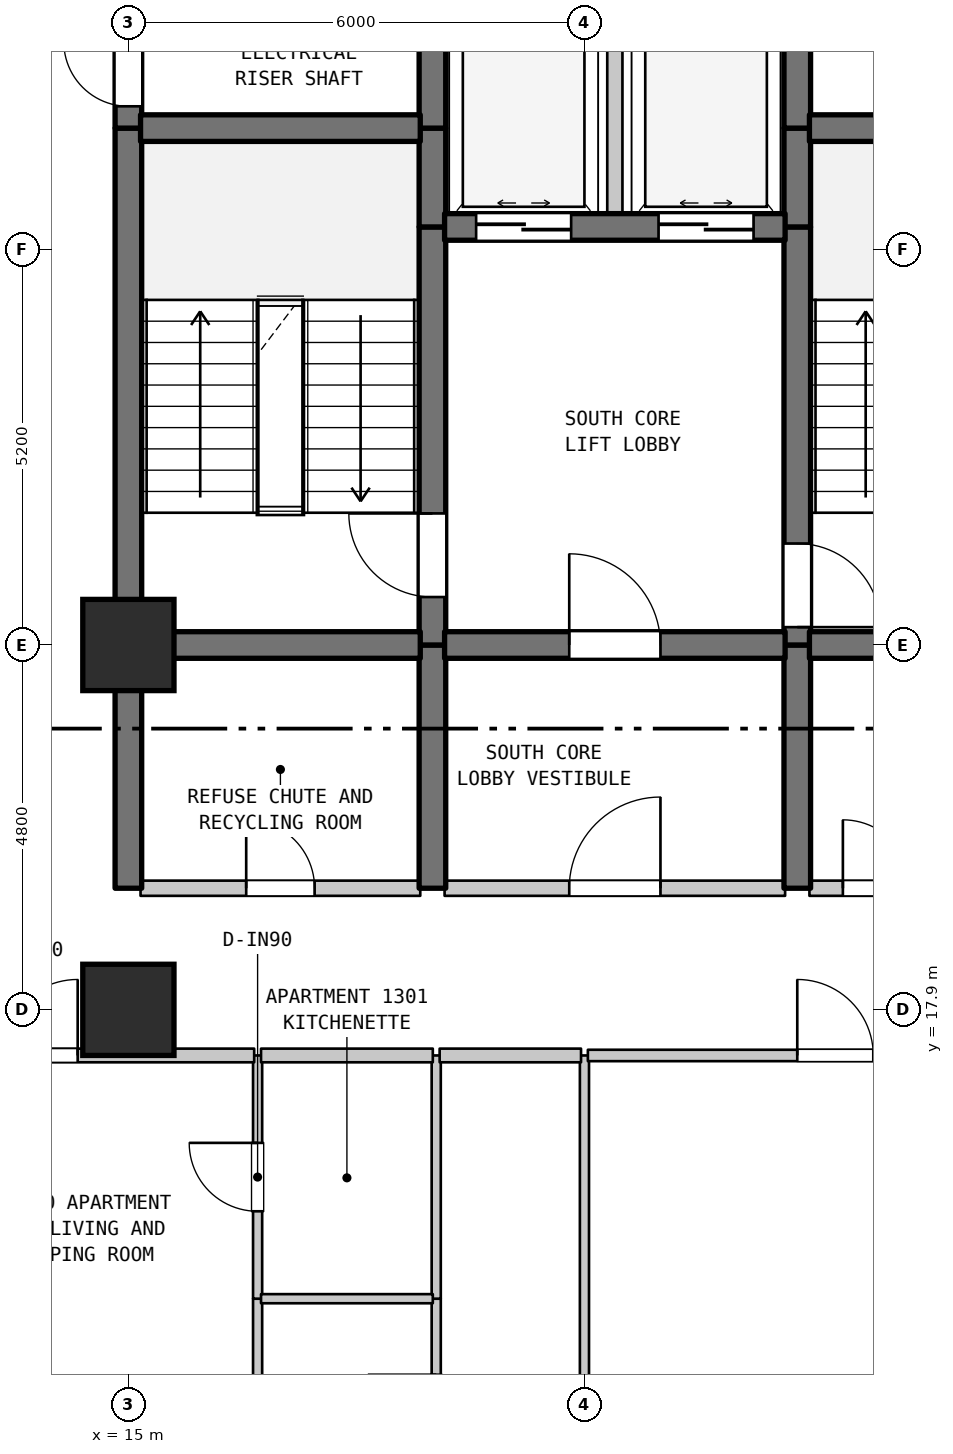
"""IFC4 building model, lengths in metres.
Left out: names, types, materials, properties, quantities, classifications, styles, units other than length and angle.
Written with IfcOpenShell. Run it as: python <this file> out.ifc"""

import sys

from ifc_helpers import new_model, si_unit, direction, frame, frame_2d, origin, origin_2d, place, context, subcontext, project, spatial, rectangle, extrude, element, fill, save


model = new_model("IFC4")
c1 = context("Model", 3, precision=1e-05, world=origin(), true_north=direction((0.0, 1.0)))
c2 = subcontext(c1, "Body", "Model", "MODEL_VIEW")
j1 = project(units=[si_unit("LENGTHUNIT", "METRE"), si_unit("PLANEANGLEUNIT", "RADIAN")], contexts=[c1])
p1 = place(None, origin())
s1 = spatial("IfcSite", under=j1, at=p1, CompositionType="ELEMENT")
p2 = place(p1, origin())
s2 = spatial("IfcBuilding", under=s1, at=p2, CompositionType="ELEMENT")
p3 = place(p2, frame((0.0, 0.0, 57.3)))
s3 = spatial("IfcBuildingStorey", under=s2, at=p3, CompositionType="ELEMENT", Elevation=57.3)
for number, where, z_axis, x_axis in (
    (1, (15.0, 17.9, 0.0), (0.0, 0.0, 1.0), (1.0, 0.0, 0.0)),
    (2, (15.0, 22.7, 0.0), (0.0, 0.0, 1.0), (1.0, 0.0, 0.0)),
):
    element("IfcColumn", number, at=place(p3, frame(where, z_axis=z_axis, x_axis=x_axis)), inside=s3, PredefinedType="COLUMN", context=c2, shape_type="SweptSolid", body=[
        extrude(rectangle(XDim=1.2, YDim=1.2, at=origin_2d()), origin(), (0.0, 0.0, 1.0), 3.7),
    ])
p4 = place(p3, frame((15.0, 19.5, 0.0), z_axis=(0.0, 0.0, 1.0), x_axis=(0.0, 1.0, 0.0)))
e3 = element("IfcWall", 3, at=p4, inside=s3, PredefinedType="SHEAR", context=c2, shape_type="SweptSolid", body=[
    extrude(rectangle(XDim=3.2, YDim=0.35, at=frame_2d((1.6, 0.0))), origin(), (0.0, 0.0, 1.0), 3.28),
])
p5 = place(p3, frame((15.0, 22.7, 0.0), z_axis=(0.0, 0.0, 1.0), x_axis=(0.0, 1.0, 0.0)))
e4 = element("IfcWall", 4, at=p5, inside=s3, PredefinedType="SHEAR", context=c2, shape_type="SweptSolid", body=[
    extrude(rectangle(XDim=6.8, YDim=0.35, at=frame_2d((3.4, 0.0))), origin(), (0.0, 0.0, 1.0), 3.28),
])
p6 = place(p3, frame((15.0, 29.5, 0.0), z_axis=(0.0, 0.0, 1.0), x_axis=(0.0, 1.0, 0.0)))
e5 = element("IfcWall", 5, at=p6, inside=s3, PredefinedType="SHEAR", context=c2, shape_type="SweptSolid", body=[
    extrude(rectangle(XDim=1.6, YDim=0.35, at=frame_2d((0.8, 0.0))), origin(), (0.0, 0.0, 1.0), 3.28),
])
p7 = place(p6, frame((0.287, 0.0, 0.0)))
e6 = element("IfcOpeningElement", 6, at=p7, cuts=e5, PredefinedType="OPENING", context=c2, shape_type="SweptSolid", body=[
    extrude(rectangle(XDim=0.85, YDim=2.1, at=frame_2d((0.425, 1.05))), frame((0.0, 0.185, 0.0), z_axis=(0.0, -1.0, 0.0), x_axis=(1.0, 0.0, 0.0)), (0.0, 0.0, 1.0), 0.37),
])
p8 = place(p3, frame((16.7, 11.2, 0.0), z_axis=(0.0, 0.0, 1.0), x_axis=(0.0, 1.0, 0.0)))
e7 = element("IfcWall", 7, at=p8, inside=s3, PredefinedType="PARTITIONING", context=c2, shape_type="SweptSolid", body=[
    extrude(rectangle(XDim=2.9, YDim=0.12, at=frame_2d((1.45, 0.0))), origin(), (0.0, 0.0, 1.0), 3.28),
])
p9 = place(p3, frame((16.7, 14.1, 0.0), z_axis=(0.0, 0.0, 1.0), x_axis=(0.0, 1.0, 0.0)))
e8 = element("IfcWall", 8, at=p9, inside=s3, PredefinedType="PARTITIONING", context=c2, shape_type="SweptSolid", body=[
    extrude(rectangle(XDim=3.2, YDim=0.12, at=frame_2d((1.6, 0.0))), origin(), (0.0, 0.0, 1.0), 3.28),
])
p10 = place(p9, frame((1.15, 0.0, 0.0)))
e9 = element("IfcOpeningElement", 9, at=p10, cuts=e8, PredefinedType="OPENING", context=c2, shape_type="SweptSolid", body=[
    extrude(rectangle(XDim=0.9, YDim=2.15, at=frame_2d((0.45, 1.075))), frame((0.0, 0.07, 0.0), z_axis=(0.0, -1.0, 0.0), x_axis=(1.0, 0.0, 0.0)), (0.0, 0.0, 1.0), 0.14),
])
p11 = place(p3, frame((19.0, 19.5, 0.0), z_axis=(0.0, 0.0, 1.0), x_axis=(0.0, 1.0, 0.0)))
e10 = element("IfcWall", 10, at=p11, inside=s3, PredefinedType="SHEAR", context=c2, shape_type="SweptSolid", body=[
    extrude(rectangle(XDim=3.2, YDim=0.35, at=frame_2d((1.6, 0.0))), origin(), (0.0, 0.0, 1.0), 3.28),
])
p12 = place(p3, frame((19.0, 22.7, 0.0), z_axis=(0.0, 0.0, 1.0), x_axis=(0.0, 1.0, 0.0)))
e11 = element("IfcWall", 11, at=p12, inside=s3, PredefinedType="SHEAR", context=c2, shape_type="SweptSolid", body=[
    extrude(rectangle(XDim=5.5, YDim=0.35, at=frame_2d((2.75, 0.0))), origin(), (0.0, 0.0, 1.0), 3.28),
])
p13 = place(p12, frame((0.631, 0.0, 0.0)))
e12 = element("IfcOpeningElement", 12, at=p13, cuts=e11, PredefinedType="OPENING", context=c2, shape_type="SweptSolid", body=[
    extrude(rectangle(XDim=1.1, YDim=2.15, at=frame_2d((0.55, 1.075))), frame((0.0, 0.185, 0.0), z_axis=(0.0, -1.0, 0.0), x_axis=(1.0, 0.0, 0.0)), (0.0, 0.0, 1.0), 0.37),
])
p14 = place(p3, frame((19.0, 28.2, 0.0), z_axis=(0.0, 0.0, 1.0), x_axis=(0.0, 1.0, 0.0)))
e13 = element("IfcWall", 13, at=p14, inside=s3, PredefinedType="SHEAR", context=c2, shape_type="SweptSolid", body=[
    extrude(rectangle(XDim=1.3, YDim=0.35, at=frame_2d((0.65, 0.0))), origin(), (0.0, 0.0, 1.0), 3.28),
])
p15 = place(p3, frame((19.0, 29.5, 0.0), z_axis=(0.0, 0.0, 1.0), x_axis=(0.0, 1.0, 0.0)))
e14 = element("IfcWall", 14, at=p15, inside=s3, PredefinedType="SHEAR", context=c2, shape_type="SweptSolid", body=[
    extrude(rectangle(XDim=5.5, YDim=0.35, at=frame_2d((2.75, 0.0))), origin(), (0.0, 0.0, 1.0), 3.28),
])
p16 = place(p15, frame((2.025, 0.0, 0.0)))
e15 = element("IfcOpeningElement", 15, at=p16, cuts=e14, PredefinedType="OPENING", context=c2, shape_type="SweptSolid", body=[
    extrude(rectangle(XDim=1.1, YDim=2.15, at=frame_2d((0.55, 1.075))), frame((0.0, 0.185, 0.0), z_axis=(0.0, -1.0, 0.0), x_axis=(1.0, 0.0, 0.0)), (0.0, 0.0, 1.0), 0.37),
])
p17 = place(p3, frame((19.05, 11.2, 0.0), z_axis=(0.0, 0.0, 1.0), x_axis=(0.0, 1.0, 0.0)))
e16 = element("IfcWall", 16, at=p17, inside=s3, PredefinedType="PARTITIONING", context=c2, shape_type="SweptSolid", body=[
    extrude(rectangle(XDim=2.9, YDim=0.12, at=frame_2d((1.45, 0.0))), origin(), (0.0, 0.0, 1.0), 3.28),
])
p18 = place(p17, frame((1.0, 0.0, 0.0)))
e17 = element("IfcOpeningElement", 17, at=p18, cuts=e16, PredefinedType="OPENING", context=c2, shape_type="SweptSolid", body=[
    extrude(rectangle(XDim=0.9, YDim=2.1, at=frame_2d((0.45, 1.05))), frame((0.0, 0.07, 0.0), z_axis=(0.0, -1.0, 0.0), x_axis=(1.0, 0.0, 0.0)), (0.0, 0.0, 1.0), 0.14),
])
p19 = place(p3, frame((19.05, 14.1, 0.0), z_axis=(0.0, 0.0, 1.0), x_axis=(0.0, 1.0, 0.0)))
e18 = element("IfcWall", 18, at=p19, inside=s3, PredefinedType="PARTITIONING", context=c2, shape_type="SweptSolid", body=[
    extrude(rectangle(XDim=3.2, YDim=0.12, at=frame_2d((1.6, 0.0))), origin(), (0.0, 0.0, 1.0), 3.28),
])
p20 = place(p3, frame((21.0, 6.71, 0.0), z_axis=(0.0, 0.0, 1.0), x_axis=(0.0, 1.0, 0.0)))
e19 = element("IfcWall", 19, at=p20, inside=s3, PredefinedType="PARTITIONING", context=c2, shape_type="SweptSolid", body=[
    extrude(rectangle(XDim=10.59, YDim=0.12, at=frame_2d((5.295, 0.0))), origin(), (0.0, 0.0, 1.0), 3.28),
])
p21 = place(p3, frame((21.4, 28.2, 0.0), z_axis=(0.0, 0.0, 1.0), x_axis=(0.0, 1.0, 0.0)))
e20 = element("IfcWall", 20, at=p21, inside=s3, PredefinedType="STANDARD", context=c2, shape_type="SweptSolid", body=[
    extrude(rectangle(XDim=2.6, YDim=0.2, at=frame_2d((1.3, 0.0))), origin(), (0.0, 0.0, 1.0), 3.28),
])
p22 = place(p3, frame((23.8, 19.5, 0.0), z_axis=(0.0, 0.0, 1.0), x_axis=(0.0, 1.0, 0.0)))
e21 = element("IfcWall", 21, at=p22, inside=s3, PredefinedType="SHEAR", context=c2, shape_type="SweptSolid", body=[
    extrude(rectangle(XDim=3.2, YDim=0.35, at=frame_2d((1.6, 0.0))), origin(), (0.0, 0.0, 1.0), 3.28),
])
p23 = place(p3, frame((23.8, 22.7, 0.0), z_axis=(0.0, 0.0, 1.0), x_axis=(0.0, 1.0, 0.0)))
e22 = element("IfcWall", 22, at=p23, inside=s3, PredefinedType="SHEAR", context=c2, shape_type="SweptSolid", body=[
    extrude(rectangle(XDim=5.5, YDim=0.35, at=frame_2d((2.75, 0.0))), origin(), (0.0, 0.0, 1.0), 3.28),
])
p24 = place(p23, frame((0.235, 0.0, 0.0)))
e23 = element("IfcOpeningElement", 23, at=p24, cuts=e22, PredefinedType="OPENING", context=c2, shape_type="SweptSolid", body=[
    extrude(rectangle(XDim=1.1, YDim=2.15, at=frame_2d((0.55, 1.075))), frame((0.0, 0.185, 0.0), z_axis=(0.0, -1.0, 0.0), x_axis=(1.0, 0.0, 0.0)), (0.0, 0.0, 1.0), 0.37),
])
for number, where, z_axis, x_axis in (
    (24, (23.8, 28.2, 0.0), (0.0, 0.0, 1.0), (0.0, 1.0, 0.0)),
    (25, (23.8, 29.5, 0.0), (0.0, 0.0, 1.0), (0.0, 1.0, 0.0)),
):
    element("IfcWall", number, at=place(p3, frame(where, z_axis=z_axis, x_axis=x_axis)), inside=s3, PredefinedType="SHEAR", context=c2, shape_type="SweptSolid", body=[
        extrude(rectangle(XDim=1.3, YDim=0.35, at=frame_2d((0.65, 0.0))), origin(), (0.0, 0.0, 1.0), 3.28),
    ])
p25 = place(p3, frame((16.745, 14.1, 0.0), z_axis=(0.0, 0.0, 1.0), x_axis=(1.0, 0.0, 0.0)))
e26 = element("IfcWall", 26, at=p25, inside=s3, PredefinedType="PARTITIONING", context=c2, shape_type="SweptSolid", body=[
    extrude(rectangle(XDim=2.26, YDim=0.12, at=frame_2d((1.13, 0.0))), origin(), (0.0, 0.0, 1.0), 3.28),
])
p26 = place(p3, frame((12.875, 17.3, 0.0), z_axis=(0.0, 0.0, 1.0), x_axis=(1.0, 0.0, 0.0)))
e27 = element("IfcWall", 27, at=p26, inside=s3, PredefinedType="STANDARD", context=c2, shape_type="SweptSolid", body=[
    extrude(rectangle(XDim=3.78, YDim=0.18, at=frame_2d((1.89, 0.0))), origin(), (0.0, 0.0, 1.0), 3.28),
])
p27 = place(p26, frame((0.458, 0.0, 0.0)))
e28 = element("IfcOpeningElement", 28, at=p27, cuts=e27, PredefinedType="OPENING", context=c2, shape_type="SweptSolid", body=[
    extrude(rectangle(XDim=1.0, YDim=2.15, at=frame_2d((0.5, 1.075))), frame((0.0, 0.1, 0.0), z_axis=(0.0, -1.0, 0.0), x_axis=(1.0, 0.0, 0.0)), (0.0, 0.0, 1.0), 0.2),
])
p28 = place(p3, frame((16.745, 17.3, 0.0), z_axis=(0.0, 0.0, 1.0), x_axis=(1.0, 0.0, 0.0)))
e29 = element("IfcWall", 29, at=p28, inside=s3, PredefinedType="STANDARD", context=c2, shape_type="SweptSolid", body=[
    extrude(rectangle(XDim=2.26, YDim=0.18, at=frame_2d((1.13, 0.0))), origin(), (0.0, 0.0, 1.0), 3.28),
])
p29 = place(p3, frame((19.095, 17.3, 0.0), z_axis=(0.0, 0.0, 1.0), x_axis=(1.0, 0.0, 0.0)))
e30 = element("IfcWall", 30, at=p29, inside=s3, PredefinedType="STANDARD", context=c2, shape_type="SweptSolid", body=[
    extrude(rectangle(XDim=1.86, YDim=0.18, at=frame_2d((0.93, 0.0))), origin(), (0.0, 0.0, 1.0), 3.28),
])
p30 = place(p3, frame((21.045, 17.3, 0.0), z_axis=(0.0, 0.0, 1.0), x_axis=(1.0, 0.0, 0.0)))
e31 = element("IfcWall", 31, at=p30, inside=s3, PredefinedType="STANDARD", context=c2, shape_type="SweptSolid", body=[
    extrude(rectangle(XDim=6.51, YDim=0.15, at=frame_2d((3.255, 0.0))), origin(), (0.0, 0.0, 1.0), 3.28),
])
p31 = place(p30, frame((2.755, 0.0, 0.0)))
e32 = element("IfcOpeningElement", 32, at=p31, cuts=e31, PredefinedType="OPENING", context=c2, shape_type="SweptSolid", body=[
    extrude(rectangle(XDim=1.0, YDim=2.15, at=frame_2d((0.5, 1.075))), frame((0.0, 0.085, 0.0), z_axis=(0.0, -1.0, 0.0), x_axis=(1.0, 0.0, 0.0)), (0.0, 0.0, 1.0), 0.17),
])
p32 = place(p3, frame((15.16, 19.5, 0.0), z_axis=(0.0, 0.0, 1.0), x_axis=(1.0, 0.0, 0.0)))
e33 = element("IfcWall", 33, at=p32, inside=s3, PredefinedType="STANDARD", context=c2, shape_type="SweptSolid", body=[
    extrude(rectangle(XDim=3.68, YDim=0.2, at=frame_2d((1.84, 0.0))), origin(), (0.0, 0.0, 1.0), 3.28),
])
p33 = place(p32, frame((1.39, 0.0, 0.0)))
e34 = element("IfcOpeningElement", 34, at=p33, cuts=e33, PredefinedType="OPENING", context=c2, shape_type="SweptSolid", body=[
    extrude(rectangle(XDim=0.9, YDim=2.15, at=frame_2d((0.45, 1.075))), frame((0.0, 0.11, 0.0), z_axis=(0.0, -1.0, 0.0), x_axis=(1.0, 0.0, 0.0)), (0.0, 0.0, 1.0), 0.22),
])
p34 = place(p3, frame((19.16, 19.5, 0.0), z_axis=(0.0, 0.0, 1.0), x_axis=(1.0, 0.0, 0.0)))
e35 = element("IfcWall", 35, at=p34, inside=s3, PredefinedType="STANDARD", context=c2, shape_type="SweptSolid", body=[
    extrude(rectangle(XDim=4.48, YDim=0.2, at=frame_2d((2.24, 0.0))), origin(), (0.0, 0.0, 1.0), 3.28),
])
p35 = place(p34, frame((1.64, 0.0, 0.0)))
e36 = element("IfcOpeningElement", 36, at=p35, cuts=e35, PredefinedType="OPENING", context=c2, shape_type="SweptSolid", body=[
    extrude(rectangle(XDim=1.2, YDim=2.2, at=frame_2d((0.6, 1.1))), frame((0.0, 0.11, 0.0), z_axis=(0.0, -1.0, 0.0), x_axis=(1.0, 0.0, 0.0)), (0.0, 0.0, 1.0), 0.22),
])
p36 = place(p3, frame((23.96, 19.5, 0.0), z_axis=(0.0, 0.0, 1.0), x_axis=(1.0, 0.0, 0.0)))
e37 = element("IfcWall", 37, at=p36, inside=s3, PredefinedType="STANDARD", context=c2, shape_type="SweptSolid", body=[
    extrude(rectangle(XDim=1.855, YDim=0.2, at=frame_2d((0.927, 0.0))), origin(), (0.0, 0.0, 1.0), 3.28),
])
p37 = place(p36, frame((0.44, 0.0, 0.0)))
e38 = element("IfcOpeningElement", 38, at=p37, cuts=e37, PredefinedType="OPENING", context=c2, shape_type="SweptSolid", body=[
    extrude(rectangle(XDim=0.9, YDim=2.15, at=frame_2d((0.45, 1.075))), frame((0.0, 0.11, 0.0), z_axis=(0.0, -1.0, 0.0), x_axis=(1.0, 0.0, 0.0)), (0.0, 0.0, 1.0), 0.22),
])
p38 = place(p3, frame((15.16, 22.7, 0.0), z_axis=(0.0, 0.0, 1.0), x_axis=(1.0, 0.0, 0.0)))
e39 = element("IfcWall", 39, at=p38, inside=s3, PredefinedType="SHEAR", context=c2, shape_type="SweptSolid", body=[
    extrude(rectangle(XDim=3.68, YDim=0.35, at=frame_2d((1.84, 0.0))), origin(), (0.0, 0.0, 1.0), 3.28),
])
p39 = place(p3, frame((19.16, 22.7, 0.0), z_axis=(0.0, 0.0, 1.0), x_axis=(1.0, 0.0, 0.0)))
e40 = element("IfcWall", 40, at=p39, inside=s3, PredefinedType="SHEAR", context=c2, shape_type="SweptSolid", body=[
    extrude(rectangle(XDim=4.48, YDim=0.35, at=frame_2d((2.24, 0.0))), origin(), (0.0, 0.0, 1.0), 3.28),
])
p40 = place(p39, frame((1.64, 0.0, 0.0)))
e41 = element("IfcOpeningElement", 41, at=p40, cuts=e40, PredefinedType="OPENING", context=c2, shape_type="SweptSolid", body=[
    extrude(rectangle(XDim=1.2, YDim=2.2, at=frame_2d((0.6, 1.1))), frame((0.0, 0.185, 0.0), z_axis=(0.0, -1.0, 0.0), x_axis=(1.0, 0.0, 0.0)), (0.0, 0.0, 1.0), 0.37),
])
p41 = place(p3, frame((23.96, 22.7, 0.0), z_axis=(0.0, 0.0, 1.0), x_axis=(1.0, 0.0, 0.0)))
e42 = element("IfcWall", 42, at=p41, inside=s3, PredefinedType="SHEAR", context=c2, shape_type="SweptSolid", body=[
    extrude(rectangle(XDim=1.855, YDim=0.35, at=frame_2d((0.927, 0.0))), origin(), (0.0, 0.0, 1.0), 3.28),
])
p42 = place(p3, frame((19.16, 28.2, 0.0), z_axis=(0.0, 0.0, 1.0), x_axis=(1.0, 0.0, 0.0)))
e43 = element("IfcWall", 43, at=p42, inside=s3, PredefinedType="SHEAR", context=c2, shape_type="SweptSolid", body=[
    extrude(rectangle(XDim=4.48, YDim=0.35, at=frame_2d((2.24, 0.0))), origin(), (0.0, 0.0, 1.0), 3.28),
])
p43 = place(p42, frame((0.415, 0.0, 0.0)))
e44 = element("IfcOpeningElement", 44, at=p43, cuts=e43, PredefinedType="OPENING", context=c2, shape_type="SweptSolid", body=[
    extrude(rectangle(XDim=1.25, YDim=2.2, at=frame_2d((0.625, 1.1))), frame((0.0, 0.185, 0.0), z_axis=(0.0, -1.0, 0.0), x_axis=(1.0, 0.0, 0.0)), (0.0, 0.0, 1.0), 0.37),
])
p44 = place(p42, frame((2.815, 0.0, 0.0)))
e45 = element("IfcOpeningElement", 45, at=p44, cuts=e43, PredefinedType="OPENING", context=c2, shape_type="SweptSolid", body=[
    extrude(rectangle(XDim=1.25, YDim=2.2, at=frame_2d((0.625, 1.1))), frame((0.0, 0.185, 0.0), z_axis=(0.0, -1.0, 0.0), x_axis=(1.0, 0.0, 0.0)), (0.0, 0.0, 1.0), 0.37),
])
p45 = place(p3, frame((15.16, 29.5, 0.0), z_axis=(0.0, 0.0, 1.0), x_axis=(1.0, 0.0, 0.0)))
e46 = element("IfcWall", 46, at=p45, inside=s3, PredefinedType="SHEAR", context=c2, shape_type="SweptSolid", body=[
    extrude(rectangle(XDim=3.68, YDim=0.35, at=frame_2d((1.84, 0.0))), origin(), (0.0, 0.0, 1.0), 3.28),
])
p46 = place(p3, frame((23.96, 29.5, 0.0), z_axis=(0.0, 0.0, 1.0), x_axis=(1.0, 0.0, 0.0)))
e47 = element("IfcWall", 47, at=p46, inside=s3, PredefinedType="SHEAR", context=c2, shape_type="SweptSolid", body=[
    extrude(rectangle(XDim=3.18, YDim=0.35, at=frame_2d((1.59, 0.0))), origin(), (0.0, 0.0, 1.0), 3.28),
])
p47 = place(p7, origin())
e48 = element("IfcDoor", 48, at=p47, inside=s3, OperationType="SINGLE_SWING_RIGHT", PredefinedType="DOOR", context=c2, shape_type="SweptSolid", body=[
    extrude(rectangle(XDim=0.85, YDim=2.1, at=frame_2d((0.425, 1.05))), frame((0.0, 0.025, 0.0), z_axis=(0.0, -1.0, 0.0), x_axis=(1.0, 0.0, 0.0)), (0.0, 0.0, 1.0), 0.05),
])
fill(e6, e48)
p48 = place(p10, origin())
e49 = element("IfcDoor", 49, at=p48, inside=s3, OperationType="SINGLE_SWING_RIGHT", PredefinedType="DOOR", context=c2, shape_type="SweptSolid", body=[
    extrude(rectangle(XDim=0.9, YDim=2.15, at=frame_2d((0.45, 1.075))), frame((0.0, 0.025, 0.0), z_axis=(0.0, -1.0, 0.0), x_axis=(1.0, 0.0, 0.0)), (0.0, 0.0, 1.0), 0.05),
])
fill(e9, e49)
p49 = place(p13, origin())
e50 = element("IfcDoor", 50, at=p49, inside=s3, OperationType="SINGLE_SWING_RIGHT", PredefinedType="DOOR", context=c2, shape_type="SweptSolid", body=[
    extrude(rectangle(XDim=1.1, YDim=2.15, at=frame_2d((0.55, 1.075))), frame((0.0, 0.025, 0.0), z_axis=(0.0, -1.0, 0.0), x_axis=(1.0, 0.0, 0.0)), (0.0, 0.0, 1.0), 0.05),
])
fill(e12, e50)
p50 = place(p24, frame((1.1, 0.0, 0.0), z_axis=(0.0, 0.0, 1.0), x_axis=(-1.0, 0.0, 0.0)))
e51 = element("IfcDoor", 51, at=p50, inside=s3, OperationType="SINGLE_SWING_LEFT", PredefinedType="DOOR", context=c2, shape_type="SweptSolid", body=[
    extrude(rectangle(XDim=1.1, YDim=2.15, at=frame_2d((0.55, 1.075))), frame((0.0, 0.025, 0.0), z_axis=(0.0, -1.0, 0.0), x_axis=(1.0, 0.0, 0.0)), (0.0, 0.0, 1.0), 0.05),
])
fill(e23, e51)
p51 = place(p27, origin())
e52 = element("IfcDoor", 52, at=p51, inside=s3, OperationType="SINGLE_SWING_RIGHT", PredefinedType="DOOR", context=c2, shape_type="SweptSolid", body=[
    extrude(rectangle(XDim=1.0, YDim=2.15, at=frame_2d((0.5, 1.075))), frame((0.0, 0.025, 0.0), z_axis=(0.0, -1.0, 0.0), x_axis=(1.0, 0.0, 0.0)), (0.0, 0.0, 1.0), 0.05),
])
fill(e28, e52)
p52 = place(p31, origin())
e53 = element("IfcDoor", 53, at=p52, inside=s3, OperationType="SINGLE_SWING_LEFT", PredefinedType="DOOR", context=c2, shape_type="SweptSolid", body=[
    extrude(rectangle(XDim=1.0, YDim=2.15, at=frame_2d((0.5, 1.075))), frame((0.0, 0.025, 0.0), z_axis=(0.0, -1.0, 0.0), x_axis=(1.0, 0.0, 0.0)), (0.0, 0.0, 1.0), 0.05),
])
fill(e32, e53)
p53 = place(p33, origin())
e54 = element("IfcDoor", 54, at=p53, inside=s3, OperationType="SINGLE_SWING_LEFT", PredefinedType="DOOR", context=c2, shape_type="SweptSolid", body=[
    extrude(rectangle(XDim=0.9, YDim=2.15, at=frame_2d((0.45, 1.075))), frame((0.0, 0.025, 0.0), z_axis=(0.0, -1.0, 0.0), x_axis=(1.0, 0.0, 0.0)), (0.0, 0.0, 1.0), 0.05),
])
fill(e34, e54)
p54 = place(p35, origin())
e55 = element("IfcDoor", 55, at=p54, inside=s3, OperationType="SINGLE_SWING_RIGHT", PredefinedType="DOOR", context=c2, shape_type="SweptSolid", body=[
    extrude(rectangle(XDim=1.2, YDim=2.2, at=frame_2d((0.6, 1.1))), frame((0.0, 0.025, 0.0), z_axis=(0.0, -1.0, 0.0), x_axis=(1.0, 0.0, 0.0)), (0.0, 0.0, 1.0), 0.05),
])
fill(e36, e55)
p55 = place(p37, origin())
e56 = element("IfcDoor", 56, at=p55, inside=s3, OperationType="SINGLE_SWING_LEFT", PredefinedType="DOOR", context=c2, shape_type="SweptSolid", body=[
    extrude(rectangle(XDim=0.9, YDim=2.15, at=frame_2d((0.45, 1.075))), frame((0.0, 0.025, 0.0), z_axis=(0.0, -1.0, 0.0), x_axis=(1.0, 0.0, 0.0)), (0.0, 0.0, 1.0), 0.05),
])
fill(e38, e56)
p56 = place(p40, origin())
e57 = element("IfcDoor", 57, at=p56, inside=s3, OperationType="SINGLE_SWING_LEFT", PredefinedType="DOOR", context=c2, shape_type="SweptSolid", body=[
    extrude(rectangle(XDim=1.2, YDim=2.2, at=frame_2d((0.6, 1.1))), frame((0.0, 0.025, 0.0), z_axis=(0.0, -1.0, 0.0), x_axis=(1.0, 0.0, 0.0)), (0.0, 0.0, 1.0), 0.05),
])
fill(e41, e57)
p57 = place(p43, origin())
e58 = element("IfcDoor", 58, at=p57, inside=s3, OperationType="DOUBLE_DOOR_SLIDING", PredefinedType="DOOR", context=c2, shape_type="SweptSolid", body=[
    extrude(rectangle(XDim=1.25, YDim=2.2, at=frame_2d((0.625, 1.1))), frame((0.0, 0.025, 0.0), z_axis=(0.0, -1.0, 0.0), x_axis=(1.0, 0.0, 0.0)), (0.0, 0.0, 1.0), 0.05),
])
fill(e44, e58)
p58 = place(p44, origin())
e59 = element("IfcDoor", 59, at=p58, inside=s3, OperationType="DOUBLE_DOOR_SLIDING", PredefinedType="DOOR", context=c2, shape_type="SweptSolid", body=[
    extrude(rectangle(XDim=1.25, YDim=2.2, at=frame_2d((0.625, 1.1))), frame((0.0, 0.025, 0.0), z_axis=(0.0, -1.0, 0.0), x_axis=(1.0, 0.0, 0.0)), (0.0, 0.0, 1.0), 0.05),
])
fill(e45, e59)
save(model, sys.argv[1])
